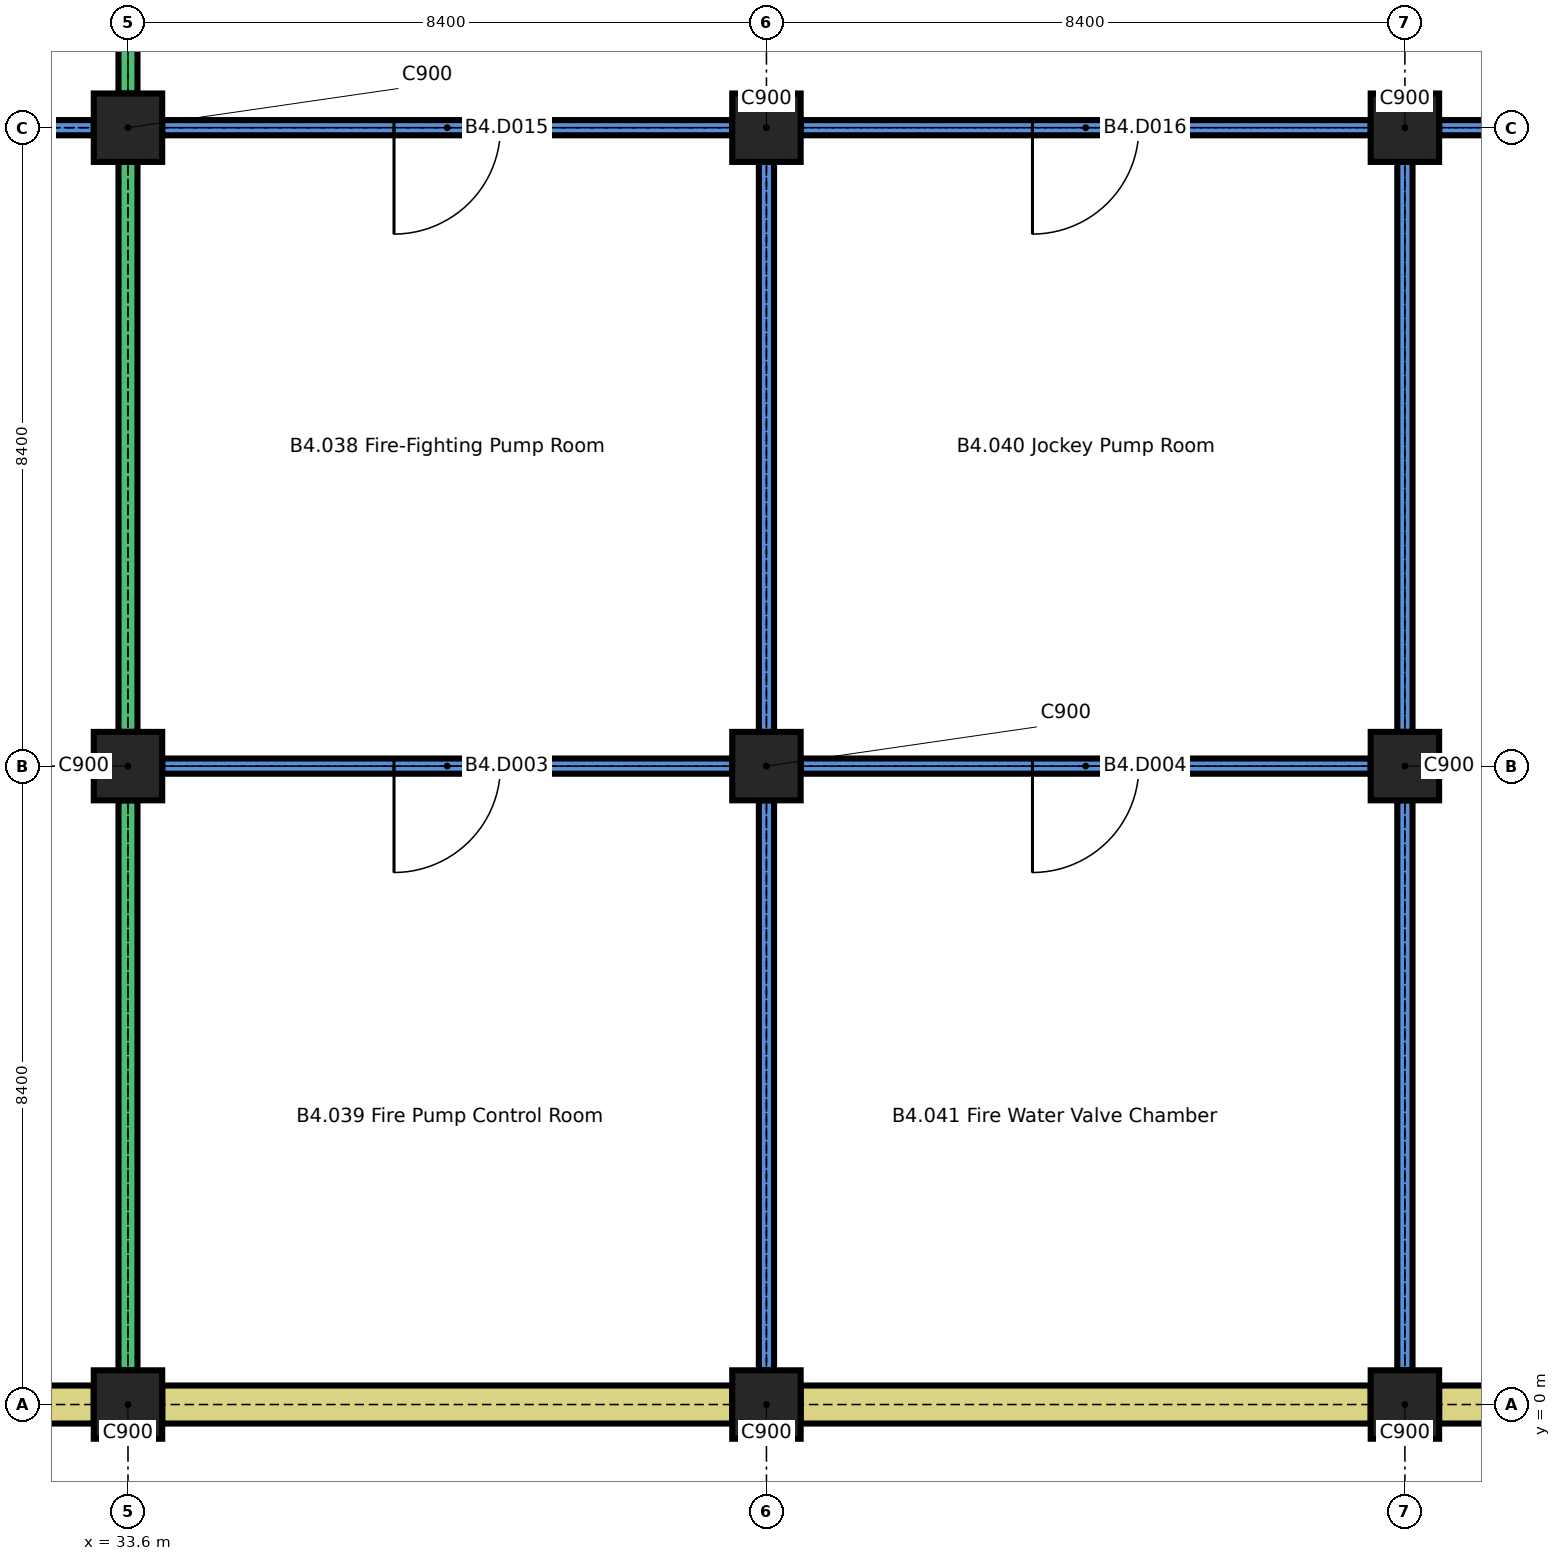
"""IFC4 building model, lengths in metres.
Left out: names, types, materials, properties, quantities, classifications, styles, units other than length and angle.
Written with IfcOpenShell. Run it as: python <this file> out.ifc"""

import sys

from ifc_helpers import new_model, si_unit, direction, frame, frame_2d, origin, origin_2d, place, context, subcontext, project, spatial, rectangle, extrude, element, fill, save


model = new_model("IFC4")
c1 = context("Model", 3, precision=1e-05, world=origin(), true_north=direction((0.0, 1.0)))
c2 = subcontext(c1, "Body", "Model", "MODEL_VIEW")
j1 = project(units=[si_unit("LENGTHUNIT", "METRE"), si_unit("PLANEANGLEUNIT", "RADIAN")], contexts=[c1])
p1 = place(None, origin())
s1 = spatial("IfcSite", under=j1, at=p1, CompositionType="ELEMENT")
p2 = place(p1, origin())
s2 = spatial("IfcBuilding", under=s1, at=p2, CompositionType="ELEMENT")
p3 = place(p2, frame((0.0, 0.0, -15.0)))
s3 = spatial("IfcBuildingStorey", under=s2, at=p3, CompositionType="ELEMENT", Elevation=-15.0)
for number, where, z_axis, x_axis in (
    (1, (33.6, 0.0, 0.0), (0.0, 0.0, 1.0), (1.0, 0.0, 0.0)),
    (2, (42.0, 0.0, 0.0), (0.0, 0.0, 1.0), (1.0, 0.0, 0.0)),
    (3, (50.4, 0.0, 0.0), (0.0, 0.0, 1.0), (1.0, 0.0, 0.0)),
    (4, (33.6, 8.4, 0.0), (0.0, 0.0, 1.0), (1.0, 0.0, 0.0)),
    (5, (42.0, 8.4, 0.0), (0.0, 0.0, 1.0), (1.0, 0.0, 0.0)),
    (6, (50.4, 8.4, 0.0), (0.0, 0.0, 1.0), (1.0, 0.0, 0.0)),
    (7, (33.6, 16.8, 0.0), (0.0, 0.0, 1.0), (1.0, 0.0, 0.0)),
    (8, (42.0, 16.8, 0.0), (0.0, 0.0, 1.0), (1.0, 0.0, 0.0)),
    (9, (50.4, 16.8, 0.0), (0.0, 0.0, 1.0), (1.0, 0.0, 0.0)),
):
    element("IfcColumn", number, at=place(p3, frame(where, z_axis=z_axis, x_axis=x_axis)), inside=s3, PredefinedType="COLUMN", context=c2, shape_type="SweptSolid", body=[
        extrude(rectangle(XDim=0.9, YDim=0.9, at=origin_2d()), origin(), (0.0, 0.0, 1.0), 3.2),
    ])
for number, where, z_axis, x_axis in (
    (10, (25.65, 0.0, 0.0), (0.0, 0.0, 1.0), (1.0, 0.0, 0.0)),
    (11, (34.05, 0.0, 0.0), (0.0, 0.0, 1.0), (1.0, 0.0, 0.0)),
    (12, (42.45, 0.0, 0.0), (0.0, 0.0, 1.0), (1.0, 0.0, 0.0)),
    (13, (50.85, 0.0, 0.0), (0.0, 0.0, 1.0), (1.0, 0.0, 0.0)),
):
    element("IfcWall", number, at=place(p3, frame(where, z_axis=z_axis, x_axis=x_axis)), inside=s3, PredefinedType="SOLIDWALL", context=c2, shape_type="SweptSolid", body=[
        extrude(rectangle(XDim=7.5, YDim=0.5, at=frame_2d((3.75, 0.0))), origin(), (0.0, 0.0, 1.0), 3.2),
    ])
p4 = place(p3, frame((34.05, 8.4, 0.0), z_axis=(0.0, 0.0, 1.0), x_axis=(1.0, 0.0, 0.0)))
e14 = element("IfcWall", 14, at=p4, inside=s3, PredefinedType="PARTITIONING", context=c2, shape_type="SweptSolid", body=[
    extrude(rectangle(XDim=7.5, YDim=0.2, at=frame_2d((3.75, 0.0))), origin(), (0.0, 0.0, 1.0), 3.2),
])
p5 = place(p4, frame((3.05, 0.0, 0.0)))
e15 = element("IfcOpeningElement", 15, at=p5, cuts=e14, PredefinedType="OPENING", context=c2, shape_type="SweptSolid", body=[
    extrude(rectangle(XDim=1.4, YDim=2.1, at=frame_2d((0.7, 1.05))), frame((0.0, 0.11, 0.0), z_axis=(0.0, -1.0, 0.0), x_axis=(1.0, 0.0, 0.0)), (0.0, 0.0, 1.0), 0.22),
])
p6 = place(p3, frame((42.45, 8.4, 0.0), z_axis=(0.0, 0.0, 1.0), x_axis=(1.0, 0.0, 0.0)))
e16 = element("IfcWall", 16, at=p6, inside=s3, PredefinedType="PARTITIONING", context=c2, shape_type="SweptSolid", body=[
    extrude(rectangle(XDim=7.5, YDim=0.2, at=frame_2d((3.75, 0.0))), origin(), (0.0, 0.0, 1.0), 3.2),
])
p7 = place(p6, frame((3.05, 0.0, 0.0)))
e17 = element("IfcOpeningElement", 17, at=p7, cuts=e16, PredefinedType="OPENING", context=c2, shape_type="SweptSolid", body=[
    extrude(rectangle(XDim=1.4, YDim=2.1, at=frame_2d((0.7, 1.05))), frame((0.0, 0.11, 0.0), z_axis=(0.0, -1.0, 0.0), x_axis=(1.0, 0.0, 0.0)), (0.0, 0.0, 1.0), 0.22),
])
p8 = place(p3, frame((17.25, 16.8, 0.0), z_axis=(0.0, 0.0, 1.0), x_axis=(1.0, 0.0, 0.0)))
e18 = element("IfcWall", 18, at=p8, inside=s3, PredefinedType="PARTITIONING", context=c2, shape_type="SweptSolid", body=[
    extrude(rectangle(XDim=15.9, YDim=0.2, at=frame_2d((7.95, 0.0))), origin(), (0.0, 0.0, 1.0), 3.2),
])
p9 = place(p8, frame((3.275, 0.0, 0.0)))
e19 = element("IfcOpeningElement", 19, at=p9, cuts=e18, PredefinedType="OPENING", context=c2, shape_type="SweptSolid", body=[
    extrude(rectangle(XDim=1.4, YDim=2.1, at=frame_2d((0.7, 1.05))), frame((0.0, 0.11, 0.0), z_axis=(0.0, -1.0, 0.0), x_axis=(1.0, 0.0, 0.0)), (0.0, 0.0, 1.0), 0.22),
])
p10 = place(p8, frame((13.325, 0.0, 0.0)))
e20 = element("IfcOpeningElement", 20, at=p10, cuts=e18, PredefinedType="OPENING", context=c2, shape_type="SweptSolid", body=[
    extrude(rectangle(XDim=1.4, YDim=2.1, at=frame_2d((0.7, 1.05))), frame((0.0, 0.11, 0.0), z_axis=(0.0, -1.0, 0.0), x_axis=(1.0, 0.0, 0.0)), (0.0, 0.0, 1.0), 0.22),
])
p11 = place(p3, frame((34.05, 16.8, 0.0), z_axis=(0.0, 0.0, 1.0), x_axis=(1.0, 0.0, 0.0)))
e21 = element("IfcWall", 21, at=p11, inside=s3, PredefinedType="PARTITIONING", context=c2, shape_type="SweptSolid", body=[
    extrude(rectangle(XDim=7.5, YDim=0.2, at=frame_2d((3.75, 0.0))), origin(), (0.0, 0.0, 1.0), 3.2),
])
p12 = place(p11, frame((3.05, 0.0, 0.0)))
e22 = element("IfcOpeningElement", 22, at=p12, cuts=e21, PredefinedType="OPENING", context=c2, shape_type="SweptSolid", body=[
    extrude(rectangle(XDim=1.4, YDim=2.1, at=frame_2d((0.7, 1.05))), frame((0.0, 0.11, 0.0), z_axis=(0.0, -1.0, 0.0), x_axis=(1.0, 0.0, 0.0)), (0.0, 0.0, 1.0), 0.22),
])
p13 = place(p3, frame((42.45, 16.8, 0.0), z_axis=(0.0, 0.0, 1.0), x_axis=(1.0, 0.0, 0.0)))
e23 = element("IfcWall", 23, at=p13, inside=s3, PredefinedType="PARTITIONING", context=c2, shape_type="SweptSolid", body=[
    extrude(rectangle(XDim=7.5, YDim=0.2, at=frame_2d((3.75, 0.0))), origin(), (0.0, 0.0, 1.0), 3.2),
])
p14 = place(p13, frame((3.05, 0.0, 0.0)))
e24 = element("IfcOpeningElement", 24, at=p14, cuts=e23, PredefinedType="OPENING", context=c2, shape_type="SweptSolid", body=[
    extrude(rectangle(XDim=1.4, YDim=2.1, at=frame_2d((0.7, 1.05))), frame((0.0, 0.11, 0.0), z_axis=(0.0, -1.0, 0.0), x_axis=(1.0, 0.0, 0.0)), (0.0, 0.0, 1.0), 0.22),
])
p15 = place(p3, frame((50.85, 16.8, 0.0), z_axis=(0.0, 0.0, 1.0), x_axis=(1.0, 0.0, 0.0)))
e25 = element("IfcWall", 25, at=p15, inside=s3, PredefinedType="PARTITIONING", context=c2, shape_type="SweptSolid", body=[
    extrude(rectangle(XDim=7.5, YDim=0.2, at=frame_2d((3.75, 0.0))), origin(), (0.0, 0.0, 1.0), 3.2),
])
p16 = place(p15, frame((3.05, 0.0, 0.0)))
e26 = element("IfcOpeningElement", 26, at=p16, cuts=e25, PredefinedType="OPENING", context=c2, shape_type="SweptSolid", body=[
    extrude(rectangle(XDim=1.4, YDim=2.1, at=frame_2d((0.7, 1.05))), frame((0.0, 0.11, 0.0), z_axis=(0.0, -1.0, 0.0), x_axis=(1.0, 0.0, 0.0)), (0.0, 0.0, 1.0), 0.22),
])
for number, where, z_axis, x_axis in (
    (27, (33.6, 0.45, 0.0), (0.0, 0.0, 1.0), (0.0, 1.0, 0.0)),
    (28, (33.6, 8.85, 0.0), (0.0, 0.0, 1.0), (0.0, 1.0, 0.0)),
):
    element("IfcWall", number, at=place(p3, frame(where, z_axis=z_axis, x_axis=x_axis)), inside=s3, PredefinedType="SOLIDWALL", context=c2, shape_type="SweptSolid", body=[
        extrude(rectangle(XDim=7.5, YDim=0.25, at=frame_2d((3.75, 0.0))), origin(), (0.0, 0.0, 1.0), 3.2),
    ])
p17 = place(p3, frame((33.6, 17.25, 0.0), z_axis=(0.0, 0.0, 1.0), x_axis=(0.0, 1.0, 0.0)))
e29 = element("IfcWall", 29, at=p17, inside=s3, PredefinedType="SOLIDWALL", context=c2, shape_type="SweptSolid", body=[
    extrude(rectangle(XDim=4.25, YDim=0.25, at=frame_2d((2.125, 0.0))), origin(), (0.0, 0.0, 1.0), 3.2),
])
p18 = place(p17, frame((1.425, 0.0, 0.0)))
e30 = element("IfcOpeningElement", 30, at=p18, cuts=e29, PredefinedType="OPENING", context=c2, shape_type="SweptSolid", body=[
    extrude(rectangle(XDim=1.4, YDim=2.1, at=frame_2d((0.7, 1.05))), frame((0.0, 0.135, 0.0), z_axis=(0.0, -1.0, 0.0), x_axis=(1.0, 0.0, 0.0)), (0.0, 0.0, 1.0), 0.27),
])
for number, where, z_axis, x_axis in (
    (31, (42.0, 0.45, 0.0), (0.0, 0.0, 1.0), (0.0, 1.0, 0.0)),
    (32, (42.0, 8.85, 0.0), (0.0, 0.0, 1.0), (0.0, 1.0, 0.0)),
    (33, (50.4, 0.45, 0.0), (0.0, 0.0, 1.0), (0.0, 1.0, 0.0)),
    (34, (50.4, 8.85, 0.0), (0.0, 0.0, 1.0), (0.0, 1.0, 0.0)),
):
    element("IfcWall", number, at=place(p3, frame(where, z_axis=z_axis, x_axis=x_axis)), inside=s3, PredefinedType="PARTITIONING", context=c2, shape_type="SweptSolid", body=[
        extrude(rectangle(XDim=7.5, YDim=0.2, at=frame_2d((3.75, 0.0))), origin(), (0.0, 0.0, 1.0), 3.2),
    ])
p19 = place(p5, origin())
e35 = element("IfcDoor", 35, at=p19, inside=s3, OperationType="SINGLE_SWING_LEFT", PredefinedType="DOOR", context=c2, shape_type="SweptSolid", body=[
    extrude(rectangle(XDim=1.4, YDim=2.1, at=frame_2d((0.7, 1.05))), frame((0.0, 0.025, 0.0), z_axis=(0.0, -1.0, 0.0), x_axis=(1.0, 0.0, 0.0)), (0.0, 0.0, 1.0), 0.05),
])
fill(e15, e35)
p20 = place(p7, origin())
e36 = element("IfcDoor", 36, at=p20, inside=s3, OperationType="SINGLE_SWING_LEFT", PredefinedType="DOOR", context=c2, shape_type="SweptSolid", body=[
    extrude(rectangle(XDim=1.4, YDim=2.1, at=frame_2d((0.7, 1.05))), frame((0.0, 0.025, 0.0), z_axis=(0.0, -1.0, 0.0), x_axis=(1.0, 0.0, 0.0)), (0.0, 0.0, 1.0), 0.05),
])
fill(e17, e36)
p21 = place(p12, origin())
e37 = element("IfcDoor", 37, at=p21, inside=s3, OperationType="SINGLE_SWING_LEFT", PredefinedType="DOOR", context=c2, shape_type="SweptSolid", body=[
    extrude(rectangle(XDim=1.4, YDim=2.1, at=frame_2d((0.7, 1.05))), frame((0.0, 0.025, 0.0), z_axis=(0.0, -1.0, 0.0), x_axis=(1.0, 0.0, 0.0)), (0.0, 0.0, 1.0), 0.05),
])
fill(e22, e37)
p22 = place(p14, origin())
e38 = element("IfcDoor", 38, at=p22, inside=s3, OperationType="SINGLE_SWING_LEFT", PredefinedType="DOOR", context=c2, shape_type="SweptSolid", body=[
    extrude(rectangle(XDim=1.4, YDim=2.1, at=frame_2d((0.7, 1.05))), frame((0.0, 0.025, 0.0), z_axis=(0.0, -1.0, 0.0), x_axis=(1.0, 0.0, 0.0)), (0.0, 0.0, 1.0), 0.05),
])
fill(e24, e38)
save(model, sys.argv[1])
